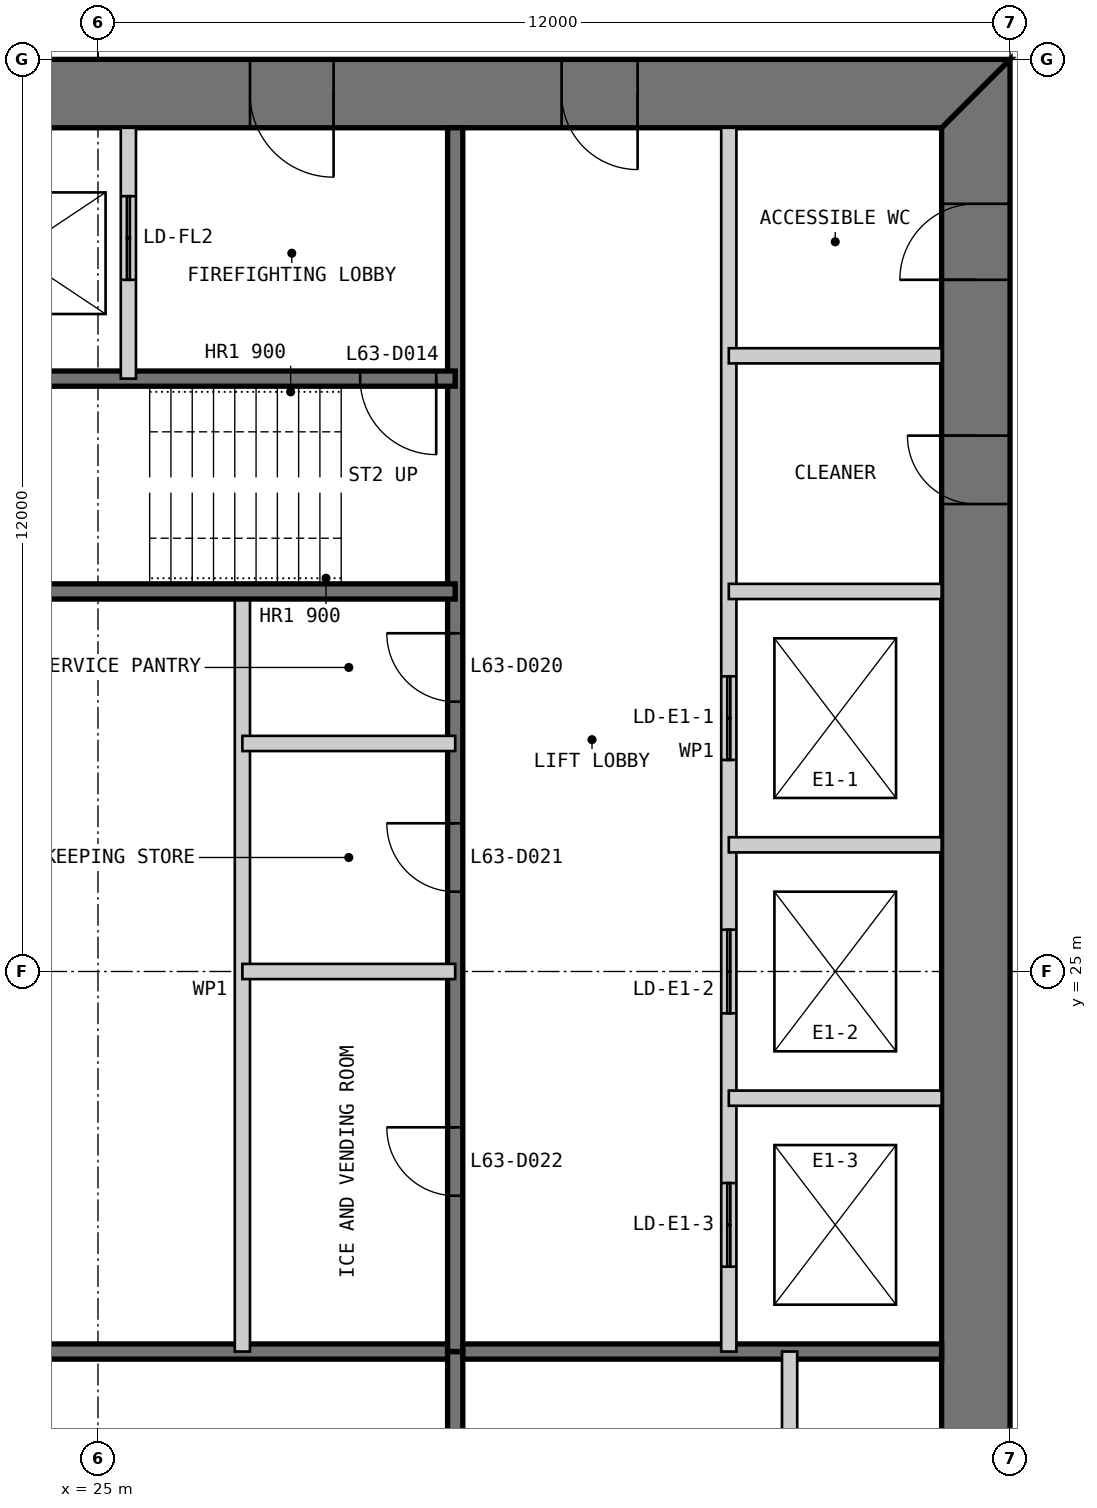
"""IFC4 building model, lengths in metres.
Left out: names, types, materials, properties, quantities, classifications, styles, units other than length and angle.
Written with IfcOpenShell. Run it as: python <this file> out.ifc"""

import sys

from ifc_helpers import new_model, si_unit, direction, frame, frame_2d, origin, place, context, subcontext, project, spatial, polyline, rectangle, outline, extrude, element, fill, save


model = new_model("IFC4")
c1 = context("Model", 3, precision=1e-05, world=origin(), true_north=direction((0.0, 1.0)))
c2 = subcontext(c1, "Body", "Model", "MODEL_VIEW")
j1 = project(units=[si_unit("LENGTHUNIT", "METRE"), si_unit("PLANEANGLEUNIT", "RADIAN")], contexts=[c1])
p1 = place(None, origin())
s1 = spatial("IfcSite", under=j1, at=p1, CompositionType="ELEMENT")
p2 = place(p1, origin())
s2 = spatial("IfcBuilding", under=s1, at=p2, CompositionType="ELEMENT")
p3 = place(p2, frame((0.0, 0.0, 266.2)))
s3 = spatial("IfcBuildingStorey", under=s2, at=p3, CompositionType="ELEMENT", Elevation=266.2)
p4 = place(p3, frame((36.55, 13.9, 0.0), z_axis=(0.0, 0.0, 1.0), x_axis=(0.0, 1.0, 0.0)))
e1 = element("IfcWall", 1, at=p4, inside=s3, PredefinedType="SHEAR", context=c2, shape_type="SweptSolid", body=[
    extrude(outline(polyline([(-0.9, -0.45), (23.1, -0.45), (22.2, 0.45), (0.0, 0.45), (-0.9, -0.45)])), origin(), (0.0, 0.0, 1.0), 3.4),
])
p5 = place(p4, frame((20.2, 0.0, 0.0)))
e2 = element("IfcOpeningElement", 2, at=p5, cuts=e1, PredefinedType="OPENING", context=c2, shape_type="SweptSolid", body=[
    extrude(rectangle(XDim=1.0, YDim=2.2, at=frame_2d((0.5, 1.1))), frame((0.0, 0.46, 0.0), z_axis=(0.0, -1.0, 0.0), x_axis=(1.0, 0.0, 0.0)), (0.0, 0.0, 1.0), 0.92),
])
p6 = place(p4, frame((17.25, 0.0, 0.0)))
e3 = element("IfcOpeningElement", 3, at=p6, cuts=e1, PredefinedType="OPENING", context=c2, shape_type="SweptSolid", body=[
    extrude(rectangle(XDim=0.9, YDim=2.2, at=frame_2d((0.45, 1.1))), frame((0.0, 0.46, 0.0), z_axis=(0.0, -1.0, 0.0), x_axis=(1.0, 0.0, 0.0)), (0.0, 0.0, 1.0), 0.92),
])
p7 = place(p3, frame((37.0, 36.55, 0.0), z_axis=(0.0, 0.0, 1.0), x_axis=(-1.0, 0.0, 0.0)))
e4 = element("IfcWall", 4, at=p7, inside=s3, PredefinedType="SHEAR", context=c2, shape_type="SweptSolid", body=[
    extrude(outline(polyline([(0.0, -0.45), (24.0, -0.45), (23.1, 0.45), (0.9, 0.45), (0.0, -0.45)])), origin(), (0.0, 0.0, 1.0), 3.4),
])
p8 = place(p7, frame((4.9, 0.0, 0.0)))
e5 = element("IfcOpeningElement", 5, at=p8, cuts=e4, PredefinedType="OPENING", context=c2, shape_type="SweptSolid", body=[
    extrude(rectangle(XDim=1.0, YDim=2.2, at=frame_2d((0.5, 1.1))), frame((0.0, 0.46, 0.0), z_axis=(0.0, -1.0, 0.0), x_axis=(1.0, 0.0, 0.0)), (0.0, 0.0, 1.0), 0.92),
])
p9 = place(p7, frame((8.9, 0.0, 0.0)))
e6 = element("IfcOpeningElement", 6, at=p9, cuts=e4, PredefinedType="OPENING", context=c2, shape_type="SweptSolid", body=[
    extrude(rectangle(XDim=1.1, YDim=2.2, at=frame_2d((0.55, 1.1))), frame((0.0, 0.46, 0.0), z_axis=(0.0, -1.0, 0.0), x_axis=(1.0, 0.0, 0.0)), (0.0, 0.0, 1.0), 0.92),
])
p10 = place(p7, frame((15.05, 0.0, 0.0)))
e7 = element("IfcOpeningElement", 7, at=p10, cuts=e4, PredefinedType="OPENING", context=c2, shape_type="SweptSolid", body=[
    extrude(rectangle(XDim=0.9, YDim=2.2, at=frame_2d((0.45, 1.1))), frame((0.0, 0.46, 0.0), z_axis=(0.0, -1.0, 0.0), x_axis=(1.0, 0.0, 0.0)), (0.0, 0.0, 1.0), 0.92),
])
p11 = place(p7, frame((17.9, 0.0, 0.0)))
e8 = element("IfcOpeningElement", 8, at=p11, cuts=e4, PredefinedType="OPENING", context=c2, shape_type="SweptSolid", body=[
    extrude(rectangle(XDim=1.0, YDim=2.2, at=frame_2d((0.5, 1.1))), frame((0.0, 0.46, 0.0), z_axis=(0.0, -1.0, 0.0), x_axis=(1.0, 0.0, 0.0)), (0.0, 0.0, 1.0), 0.92),
])
p12 = place(p7, frame((21.4, 0.0, 0.0)))
e9 = element("IfcOpeningElement", 9, at=p12, cuts=e4, PredefinedType="OPENING", context=c2, shape_type="SweptSolid", body=[
    extrude(rectangle(XDim=1.0, YDim=2.2, at=frame_2d((0.5, 1.1))), frame((0.0, 0.46, 0.0), z_axis=(0.0, -1.0, 0.0), x_axis=(1.0, 0.0, 0.0)), (0.0, 0.0, 1.0), 0.92),
])
p13 = place(p3, frame((20.3, 20.0, 0.0), z_axis=(0.0, 0.0, 1.0), x_axis=(1.0, 0.0, 0.0)))
e10 = element("IfcWall", 10, at=p13, inside=s3, PredefinedType="SOLIDWALL", context=c2, shape_type="SweptSolid", body=[
    extrude(rectangle(XDim=15.8, YDim=0.2, at=frame_2d((7.9, 0.0))), origin(), (0.0, 0.0, 1.0), 3.2),
])
p14 = place(p3, frame((29.7, 13.9, 0.0), z_axis=(0.0, 0.0, 1.0), x_axis=(0.0, 1.0, 0.0)))
e11 = element("IfcWall", 11, at=p14, inside=s3, PredefinedType="SOLIDWALL", context=c2, shape_type="SweptSolid", body=[
    extrude(rectangle(XDim=6.1, YDim=0.2, at=frame_2d((3.05, 0.0))), origin(), (0.0, 0.0, 1.0), 3.2),
])
p15 = place(p3, frame((34.1, 13.9, 0.0), z_axis=(0.0, 0.0, 1.0), x_axis=(0.0, 1.0, 0.0)))
e12 = element("IfcWall", 12, at=p15, inside=s3, PredefinedType="PARTITIONING", context=c2, shape_type="SweptSolid", body=[
    extrude(rectangle(XDim=6.1, YDim=0.2, at=frame_2d((3.05, 0.0))), origin(), (0.0, 0.0, 1.0), 3.2),
])
p16 = place(p3, frame((33.3, 36.1, 0.0), z_axis=(0.0, 0.0, 1.0), x_axis=(0.0, -1.0, 0.0)))
e13 = element("IfcWall", 13, at=p16, inside=s3, PredefinedType="PARTITIONING", context=c2, shape_type="SweptSolid", body=[
    extrude(rectangle(XDim=16.1, YDim=0.2, at=frame_2d((8.05, 0.0))), origin(), (0.0, 0.0, 1.0), 3.2),
])
p17 = place(p16, frame((7.217, 0.0, 0.0)))
e14 = element("IfcOpeningElement", 14, at=p17, cuts=e13, PredefinedType="OPENING", context=c2, shape_type="SweptSolid", body=[
    extrude(rectangle(XDim=1.1, YDim=2.2, at=frame_2d((0.55, 1.1))), frame((0.0, 0.11, 0.0), z_axis=(0.0, -1.0, 0.0), x_axis=(1.0, 0.0, 0.0)), (0.0, 0.0, 1.0), 0.22),
])
p18 = place(p16, frame((10.55, 0.0, 0.0)))
e15 = element("IfcOpeningElement", 15, at=p18, cuts=e13, PredefinedType="OPENING", context=c2, shape_type="SweptSolid", body=[
    extrude(rectangle(XDim=1.1, YDim=2.2, at=frame_2d((0.55, 1.1))), frame((0.0, 0.11, 0.0), z_axis=(0.0, -1.0, 0.0), x_axis=(1.0, 0.0, 0.0)), (0.0, 0.0, 1.0), 0.22),
])
p19 = place(p16, frame((13.883, 0.0, 0.0)))
e16 = element("IfcOpeningElement", 16, at=p19, cuts=e13, PredefinedType="OPENING", context=c2, shape_type="SweptSolid", body=[
    extrude(rectangle(XDim=1.1, YDim=2.2, at=frame_2d((0.55, 1.1))), frame((0.0, 0.11, 0.0), z_axis=(0.0, -1.0, 0.0), x_axis=(1.0, 0.0, 0.0)), (0.0, 0.0, 1.0), 0.22),
])
p20 = place(p3, frame((29.7, 36.1, 0.0), z_axis=(0.0, 0.0, 1.0), x_axis=(0.0, -1.0, 0.0)))
e17 = element("IfcWall", 17, at=p20, inside=s3, PredefinedType="SOLIDWALL", context=c2, shape_type="SweptSolid", body=[
    extrude(rectangle(XDim=16.1, YDim=0.2, at=frame_2d((8.05, 0.0))), origin(), (0.0, 0.0, 1.0), 3.2),
])
p21 = place(p20, frame((6.65, 0.0, 0.0)))
e18 = element("IfcOpeningElement", 18, at=p21, cuts=e17, PredefinedType="OPENING", context=c2, shape_type="SweptSolid", body=[
    extrude(rectangle(XDim=0.9, YDim=2.2, at=frame_2d((0.45, 1.1))), frame((0.0, 0.11, 0.0), z_axis=(0.0, -1.0, 0.0), x_axis=(1.0, 0.0, 0.0)), (0.0, 0.0, 1.0), 0.22),
])
p22 = place(p20, frame((9.15, 0.0, 0.0)))
e19 = element("IfcOpeningElement", 19, at=p22, cuts=e17, PredefinedType="OPENING", context=c2, shape_type="SweptSolid", body=[
    extrude(rectangle(XDim=0.9, YDim=2.2, at=frame_2d((0.45, 1.1))), frame((0.0, 0.11, 0.0), z_axis=(0.0, -1.0, 0.0), x_axis=(1.0, 0.0, 0.0)), (0.0, 0.0, 1.0), 0.22),
])
p23 = place(p20, frame((13.15, 0.0, 0.0)))
e20 = element("IfcOpeningElement", 20, at=p23, cuts=e17, PredefinedType="OPENING", context=c2, shape_type="SweptSolid", body=[
    extrude(rectangle(XDim=0.9, YDim=2.2, at=frame_2d((0.45, 1.1))), frame((0.0, 0.11, 0.0), z_axis=(0.0, -1.0, 0.0), x_axis=(1.0, 0.0, 0.0)), (0.0, 0.0, 1.0), 0.22),
])
for number, where, z_axis, x_axis in (
    (21, (36.1, 30.0, 0.0), (0.0, 0.0, 1.0), (-1.0, 0.0, 0.0)),
    (22, (36.1, 26.667, 0.0), (0.0, 0.0, 1.0), (-1.0, 0.0, 0.0)),
    (23, (36.1, 23.333, 0.0), (0.0, 0.0, 1.0), (-1.0, 0.0, 0.0)),
):
    element("IfcWall", number, at=place(p3, frame(where, z_axis=z_axis, x_axis=x_axis)), inside=s3, PredefinedType="PARTITIONING", context=c2, shape_type="SweptSolid", body=[
        extrude(rectangle(XDim=2.8, YDim=0.2, at=frame_2d((1.4, 0.0))), origin(), (0.0, 0.0, 1.0), 3.2),
    ])
p24 = place(p3, frame((26.9, 30.0, 0.0), z_axis=(0.0, 0.0, 1.0), x_axis=(0.0, -1.0, 0.0)))
e24 = element("IfcWall", 24, at=p24, inside=s3, PredefinedType="PARTITIONING", context=c2, shape_type="SweptSolid", body=[
    extrude(rectangle(XDim=10.0, YDim=0.2, at=frame_2d((5.0, 0.0))), origin(), (0.0, 0.0, 1.0), 3.2),
])
p25 = place(p3, frame((29.7, 32.8, 0.0), z_axis=(0.0, 0.0, 1.0), x_axis=(-1.0, 0.0, 0.0)))
e25 = element("IfcWall", 25, at=p25, inside=s3, PredefinedType="SOLIDWALL", context=c2, shape_type="SweptSolid", body=[
    extrude(rectangle(XDim=9.4, YDim=0.2, at=frame_2d((4.7, 0.0))), origin(), (0.0, 0.0, 1.0), 3.2),
])
p26 = place(p25, frame((0.25, 0.0, 0.0)))
e26 = element("IfcOpeningElement", 26, at=p26, cuts=e25, PredefinedType="OPENING", context=c2, shape_type="SweptSolid", body=[
    extrude(rectangle(XDim=1.0, YDim=2.2, at=frame_2d((0.5, 1.1))), frame((0.0, 0.11, 0.0), z_axis=(0.0, -1.0, 0.0), x_axis=(1.0, 0.0, 0.0)), (0.0, 0.0, 1.0), 0.22),
])
p27 = place(p3, frame((29.7, 30.0, 0.0), z_axis=(0.0, 0.0, 1.0), x_axis=(-1.0, 0.0, 0.0)))
e27 = element("IfcWall", 27, at=p27, inside=s3, PredefinedType="SOLIDWALL", context=c2, shape_type="SweptSolid", body=[
    extrude(rectangle(XDim=15.8, YDim=0.2, at=frame_2d((7.9, 0.0))), origin(), (0.0, 0.0, 1.0), 3.2),
])
p28 = place(p3, frame((25.4, 36.1, 0.0), z_axis=(0.0, 0.0, 1.0), x_axis=(0.0, -1.0, 0.0)))
e28 = element("IfcWall", 28, at=p28, inside=s3, PredefinedType="PARTITIONING", context=c2, shape_type="SweptSolid", body=[
    extrude(rectangle(XDim=3.3, YDim=0.2, at=frame_2d((1.65, 0.0))), origin(), (0.0, 0.0, 1.0), 3.2),
])
p29 = place(p28, frame((0.9, 0.0, 0.0)))
e29 = element("IfcOpeningElement", 29, at=p29, cuts=e28, PredefinedType="OPENING", context=c2, shape_type="SweptSolid", body=[
    extrude(rectangle(XDim=1.1, YDim=2.2, at=frame_2d((0.55, 1.1))), frame((0.0, 0.11, 0.0), z_axis=(0.0, -1.0, 0.0), x_axis=(1.0, 0.0, 0.0)), (0.0, 0.0, 1.0), 0.22),
])
for number, where, z_axis, x_axis in (
    (30, (36.1, 33.1, 0.0), (0.0, 0.0, 1.0), (-1.0, 0.0, 0.0)),
    (31, (29.7, 28.0, 0.0), (0.0, 0.0, 1.0), (-1.0, 0.0, 0.0)),
    (32, (29.7, 25.0, 0.0), (0.0, 0.0, 1.0), (-1.0, 0.0, 0.0)),
):
    element("IfcWall", number, at=place(p3, frame(where, z_axis=z_axis, x_axis=x_axis)), inside=s3, PredefinedType="PARTITIONING", context=c2, shape_type="SweptSolid", body=[
        extrude(rectangle(XDim=2.8, YDim=0.2, at=frame_2d((1.4, 0.0))), origin(), (0.0, 0.0, 1.0), 3.2),
    ])
p30 = place(p8, origin())
e33 = element("IfcDoor", 33, at=p30, inside=s3, OperationType="SINGLE_SWING_LEFT", PredefinedType="DOOR", context=c2, shape_type="SweptSolid", body=[
    extrude(rectangle(XDim=1.0, YDim=2.2, at=frame_2d((0.5, 1.1))), frame((0.0, 0.025, 0.0), z_axis=(0.0, -1.0, 0.0), x_axis=(1.0, 0.0, 0.0)), (0.0, 0.0, 1.0), 0.05),
    extrude(outline(polyline([(0.0, 0.0), (0.04, 0.0), (0.04, 2.16), (0.96, 2.16), (0.96, 0.0), (1.0, 0.0), (1.0, 2.2), (0.0, 2.2), (0.0, 0.0)])), frame((0.0, 0.3, 0.0), z_axis=(0.0, -1.0, 0.0), x_axis=(1.0, 0.0, 0.0)), (0.0, 0.0, 1.0), 0.6),
])
fill(e5, e33)
p31 = place(p9, origin())
e34 = element("IfcDoor", 34, at=p31, inside=s3, OperationType="SINGLE_SWING_LEFT", PredefinedType="DOOR", context=c2, shape_type="SweptSolid", body=[
    extrude(rectangle(XDim=1.1, YDim=2.2, at=frame_2d((0.55, 1.1))), frame((0.0, 0.025, 0.0), z_axis=(0.0, -1.0, 0.0), x_axis=(1.0, 0.0, 0.0)), (0.0, 0.0, 1.0), 0.05),
    extrude(outline(polyline([(0.0, 0.0), (0.04, 0.0), (0.04, 2.16), (1.06, 2.16), (1.06, 0.0), (1.1, 0.0), (1.1, 2.2), (0.0, 2.2), (0.0, 0.0)])), frame((0.0, 0.3, 0.0), z_axis=(0.0, -1.0, 0.0), x_axis=(1.0, 0.0, 0.0)), (0.0, 0.0, 1.0), 0.6),
])
fill(e6, e34)
p32 = place(p26, origin())
e35 = element("IfcDoor", 35, at=p32, inside=s3, OperationType="SINGLE_SWING_LEFT", PredefinedType="DOOR", context=c2, shape_type="SweptSolid", body=[
    extrude(rectangle(XDim=1.0, YDim=2.2, at=frame_2d((0.5, 1.1))), frame((0.0, 0.025, 0.0), z_axis=(0.0, -1.0, 0.0), x_axis=(1.0, 0.0, 0.0)), (0.0, 0.0, 1.0), 0.05),
])
fill(e26, e35)
p33 = place(p5, origin())
e36 = element("IfcDoor", 36, at=p33, inside=s3, OperationType="SINGLE_SWING_LEFT", PredefinedType="DOOR", context=c2, shape_type="SweptSolid", body=[
    extrude(rectangle(XDim=1.0, YDim=2.2, at=frame_2d((0.5, 1.1))), frame((0.0, 0.025, 0.0), z_axis=(0.0, -1.0, 0.0), x_axis=(1.0, 0.0, 0.0)), (0.0, 0.0, 1.0), 0.05),
    extrude(outline(polyline([(0.0, 0.0), (0.04, 0.0), (0.04, 2.16), (0.96, 2.16), (0.96, 0.0), (1.0, 0.0), (1.0, 2.2), (0.0, 2.2), (0.0, 0.0)])), frame((0.0, 0.3, 0.0), z_axis=(0.0, -1.0, 0.0), x_axis=(1.0, 0.0, 0.0)), (0.0, 0.0, 1.0), 0.6),
])
fill(e2, e36)
p34 = place(p6, origin())
e37 = element("IfcDoor", 37, at=p34, inside=s3, OperationType="SINGLE_SWING_RIGHT", PredefinedType="DOOR", context=c2, shape_type="SweptSolid", body=[
    extrude(rectangle(XDim=0.9, YDim=2.2, at=frame_2d((0.45, 1.1))), frame((0.0, 0.025, 0.0), z_axis=(0.0, -1.0, 0.0), x_axis=(1.0, 0.0, 0.0)), (0.0, 0.0, 1.0), 0.05),
    extrude(outline(polyline([(0.0, 0.0), (0.04, 0.0), (0.04, 2.16), (0.86, 2.16), (0.86, 0.0), (0.9, 0.0), (0.9, 2.2), (0.0, 2.2), (0.0, 0.0)])), frame((0.0, 0.3, 0.0), z_axis=(0.0, -1.0, 0.0), x_axis=(1.0, 0.0, 0.0)), (0.0, 0.0, 1.0), 0.6),
])
fill(e3, e37)
p35 = place(p21, frame((0.9, 0.0, 0.0), z_axis=(0.0, 0.0, 1.0), x_axis=(-1.0, 0.0, 0.0)))
e38 = element("IfcDoor", 38, at=p35, inside=s3, OperationType="SINGLE_SWING_RIGHT", PredefinedType="DOOR", context=c2, shape_type="SweptSolid", body=[
    extrude(rectangle(XDim=0.9, YDim=2.2, at=frame_2d((0.45, 1.1))), frame((0.0, 0.025, 0.0), z_axis=(0.0, -1.0, 0.0), x_axis=(1.0, 0.0, 0.0)), (0.0, 0.0, 1.0), 0.05),
])
fill(e18, e38)
p36 = place(p22, frame((0.9, 0.0, 0.0), z_axis=(0.0, 0.0, 1.0), x_axis=(-1.0, 0.0, 0.0)))
e39 = element("IfcDoor", 39, at=p36, inside=s3, OperationType="SINGLE_SWING_RIGHT", PredefinedType="DOOR", context=c2, shape_type="SweptSolid", body=[
    extrude(rectangle(XDim=0.9, YDim=2.2, at=frame_2d((0.45, 1.1))), frame((0.0, 0.025, 0.0), z_axis=(0.0, -1.0, 0.0), x_axis=(1.0, 0.0, 0.0)), (0.0, 0.0, 1.0), 0.05),
])
fill(e19, e39)
p37 = place(p23, frame((0.9, 0.0, 0.0), z_axis=(0.0, 0.0, 1.0), x_axis=(-1.0, 0.0, 0.0)))
e40 = element("IfcDoor", 40, at=p37, inside=s3, OperationType="SINGLE_SWING_RIGHT", PredefinedType="DOOR", context=c2, shape_type="SweptSolid", body=[
    extrude(rectangle(XDim=0.9, YDim=2.2, at=frame_2d((0.45, 1.1))), frame((0.0, 0.025, 0.0), z_axis=(0.0, -1.0, 0.0), x_axis=(1.0, 0.0, 0.0)), (0.0, 0.0, 1.0), 0.05),
])
fill(e20, e40)
p38 = place(p29, origin())
e41 = element("IfcDoor", 41, at=p38, inside=s3, OperationType="DOUBLE_DOOR_SLIDING", PredefinedType="DOOR", context=c2, shape_type="SweptSolid", body=[
    extrude(rectangle(XDim=1.1, YDim=2.2, at=frame_2d((0.55, 1.1))), frame((0.0, 0.025, 0.0), z_axis=(0.0, -1.0, 0.0), x_axis=(1.0, 0.0, 0.0)), (0.0, 0.0, 1.0), 0.05),
])
fill(e29, e41)
p39 = place(p17, origin())
e42 = element("IfcDoor", 42, at=p39, inside=s3, OperationType="DOUBLE_DOOR_SLIDING", PredefinedType="DOOR", context=c2, shape_type="SweptSolid", body=[
    extrude(rectangle(XDim=1.1, YDim=2.2, at=frame_2d((0.55, 1.1))), frame((0.0, 0.025, 0.0), z_axis=(0.0, -1.0, 0.0), x_axis=(1.0, 0.0, 0.0)), (0.0, 0.0, 1.0), 0.05),
])
fill(e14, e42)
p40 = place(p18, origin())
e43 = element("IfcDoor", 43, at=p40, inside=s3, OperationType="DOUBLE_DOOR_SLIDING", PredefinedType="DOOR", context=c2, shape_type="SweptSolid", body=[
    extrude(rectangle(XDim=1.1, YDim=2.2, at=frame_2d((0.55, 1.1))), frame((0.0, 0.025, 0.0), z_axis=(0.0, -1.0, 0.0), x_axis=(1.0, 0.0, 0.0)), (0.0, 0.0, 1.0), 0.05),
])
fill(e15, e43)
p41 = place(p19, origin())
e44 = element("IfcDoor", 44, at=p41, inside=s3, OperationType="DOUBLE_DOOR_SLIDING", PredefinedType="DOOR", context=c2, shape_type="SweptSolid", body=[
    extrude(rectangle(XDim=1.1, YDim=2.2, at=frame_2d((0.55, 1.1))), frame((0.0, 0.025, 0.0), z_axis=(0.0, -1.0, 0.0), x_axis=(1.0, 0.0, 0.0)), (0.0, 0.0, 1.0), 0.05),
])
fill(e16, e44)
save(model, sys.argv[1])
